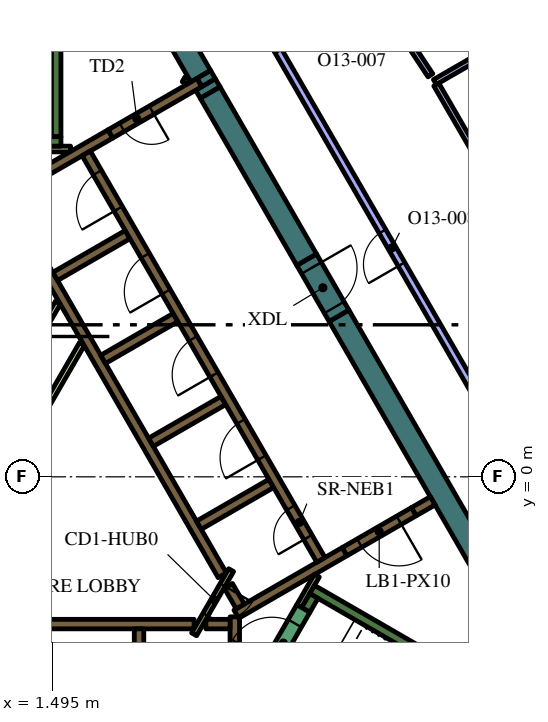
"""IFC4 building model, lengths in metres.
Left out: names, types, materials, properties, quantities, classifications, styles, units other than length and angle.
Written with IfcOpenShell. Run it as: python <this file> out.ifc"""

import sys

from ifc_helpers import new_model, si_unit, direction, frame, frame_2d, origin, place, context, subcontext, project, spatial, polyline, rectangle, outline, extrude, element, fill, save


model = new_model("IFC4")
c1 = context("Model", 3, precision=1e-05, world=origin(), true_north=direction((0.0, 1.0)))
c2 = subcontext(c1, "Body", "Model", "MODEL_VIEW")
j1 = project(units=[si_unit("LENGTHUNIT", "METRE"), si_unit("PLANEANGLEUNIT", "RADIAN")], contexts=[c1])
p1 = place(None, origin())
s1 = spatial("IfcSite", under=j1, at=p1, CompositionType="ELEMENT")
p2 = place(p1, origin())
s2 = spatial("IfcBuilding", under=s1, at=p2, CompositionType="ELEMENT")
p3 = place(p2, frame((0.0, 0.0, 300.6)))
s3 = spatial("IfcBuildingStorey", under=s2, at=p3, CompositionType="ELEMENT", Elevation=300.6)
p4 = place(p3, frame((9.042, 4.239, 0.0), z_axis=(0.0, 0.0, 1.0), x_axis=(0.500005785455, -0.866022063525, 0.0)))
e1 = element("IfcWall", 1, at=p4, inside=s3, PredefinedType="SOLIDWALL", context=c2, shape_type="SweptSolid", body=[
    extrude(rectangle(XDim=12.406, YDim=0.6, at=frame_2d((6.203, 0.0))), origin(), (0.0, 0.0, 1.0), 4.2),
])
p5 = place(p3, frame((5.529, 10.324, 0.0), z_axis=(0.0, 0.0, 1.0), x_axis=(0.499122205112, -0.866531606097, 0.0)))
e2 = element("IfcWall", 2, at=p5, inside=s3, PredefinedType="SOLIDWALL", context=c2, shape_type="SweptSolid", body=[
    extrude(rectangle(XDim=0.247, YDim=0.6, at=frame_2d((0.123, 0.0))), origin(), (0.0, 0.0, 1.0), 4.2),
])
p6 = place(p3, frame((1.989, 16.456, 0.0), z_axis=(0.0, 0.0, 1.0), x_axis=(0.499973159588, -0.866040899549, 0.0)))
e3 = element("IfcWall", 3, at=p6, inside=s3, PredefinedType="SOLIDWALL", context=c2, shape_type="SweptSolid", body=[
    extrude(rectangle(XDim=6.828, YDim=0.6, at=frame_2d((3.414, 0.0))), origin(), (0.0, 0.0, 1.0), 4.2),
])
p7 = place(p3, origin())
e4 = element("IfcWall", 4, at=p7, inside=s3, PredefinedType="SOLIDWALL", context=c2, shape_type="SweptSolid", body=[
    extrude(outline(polyline([(5.664, 10.691), (5.788, 10.476), (5.432, 10.271), (5.308, 10.486), (5.664, 10.691)])), origin(), (0.0, 0.0, 1.0), 4.2),
])
p8 = place(p3, frame((8.192, 5.711, 0.0), z_axis=(0.0, 0.0, 1.0), x_axis=(-0.500006836656, 0.866021456604, 0.0)))
e5 = element("IfcWall", 5, at=p8, inside=s3, PredefinedType="SOLIDWALL", context=c2, shape_type="SweptSolid", body=[
    extrude(rectangle(XDim=5.078, YDim=0.6, at=frame_2d((2.539, 0.0))), origin(), (0.0, 0.0, 1.0), 4.2),
])
p9 = place(p3, frame((8.334, -2.964, 0.0), z_axis=(0.0, 0.0, 1.0), x_axis=(0.866016039709, -0.500016218704, 0.0)))
e6 = element("IfcWall", 6, at=p9, inside=s3, PredefinedType="SOLIDWALL", context=c2, shape_type="SweptSolid", body=[
    extrude(rectangle(XDim=7.05, YDim=0.25, at=frame_2d((3.525, 0.0))), origin(), (0.0, 0.0, 1.0), 4.2),
])
p10 = place(p3, frame((8.168, -3.503, 0.0), z_axis=(0.0, 0.0, 1.0), x_axis=(0.49972245349, 0.866185586049, 0.0)))
e7 = element("IfcWall", 7, at=p10, inside=s3, PredefinedType="SOLIDWALL", context=c2, shape_type="SweptSolid", body=[
    extrude(rectangle(XDim=0.425, YDim=0.25, at=frame_2d((0.212, 0.0))), origin(), (0.0, 0.0, 1.0), 4.2),
])
p11 = place(p3, frame((1.6, 8.95, 0.0), z_axis=(0.0, 0.0, 1.0), x_axis=(0.0, 1.0, 0.0)))
e8 = element("IfcWall", 8, at=p11, inside=s3, PredefinedType="SOLIDWALL", context=c2, shape_type="SweptSolid", body=[
    extrude(rectangle(XDim=6.8, YDim=0.25, at=frame_2d((3.4, 0.0))), origin(), (0.0, 0.0, 1.0), 4.2),
])
p12 = place(p3, frame((1.05, 8.825, 0.0), z_axis=(0.0, 0.0, 1.0), x_axis=(1.0, 0.0, 0.0)))
e9 = element("IfcWall", 9, at=p12, inside=s3, PredefinedType="SOLIDWALL", context=c2, shape_type="SweptSolid", body=[
    extrude(rectangle(XDim=0.675, YDim=0.25, at=frame_2d((0.337, 0.0))), origin(), (0.0, 0.0, 1.0), 4.2),
])
p13 = place(p3, frame((6.3, -7.24, 0.0), z_axis=(0.0, 0.0, 1.0), x_axis=(0.0, 1.0, 0.0)))
e10 = element("IfcWall", 10, at=p13, inside=s3, PredefinedType="SOLIDWALL", context=c2, shape_type="SweptSolid", body=[
    extrude(rectangle(XDim=3.556, YDim=0.25, at=frame_2d((1.778, 0.0))), origin(), (0.0, 0.0, 1.0), 4.2),
])
p14 = place(p3, frame((5.538, -3.875, 0.0), z_axis=(0.0, 0.0, 1.0), x_axis=(1.0, 0.0, 0.0)))
e11 = element("IfcWall", 11, at=p14, inside=s3, PredefinedType="SOLIDWALL", context=c2, shape_type="SweptSolid", body=[
    extrude(rectangle(XDim=0.637, YDim=0.25, at=frame_2d((0.318, 0.0))), origin(), (0.0, 0.0, 1.0), 4.2),
])
p15 = place(p3, frame((-5.259, -3.875, 0.0), z_axis=(0.0, 0.0, 1.0), x_axis=(1.0, 0.0, 0.0)))
e12 = element("IfcWall", 12, at=p15, inside=s3, PredefinedType="SOLIDWALL", context=c2, shape_type="SweptSolid", body=[
    extrude(rectangle(XDim=10.489, YDim=0.25, at=frame_2d((5.244, 0.0))), origin(), (0.0, 0.0, 1.0), 4.2),
])
p16 = place(p3, frame((3.78, -4.0, 0.0), z_axis=(0.0, 0.0, 1.0), x_axis=(0.0, -1.0, 0.0)))
e13 = element("IfcWall", 13, at=p16, inside=s3, PredefinedType="SOLIDWALL", context=c2, shape_type="SweptSolid", body=[
    extrude(rectangle(XDim=2.2, YDim=0.25, at=frame_2d((1.1, 0.0))), origin(), (0.0, 0.0, 1.0), 4.2),
])
p17 = place(p3, frame((9.19, -1.969, 0.0), z_axis=(0.0, 0.0, 1.0), x_axis=(-0.866057109641, -0.499945079824, 0.0)))
e14 = element("IfcWall", 14, at=p17, inside=s3, PredefinedType="SOLIDWALL", context=c2, shape_type="SweptSolid", body=[
    extrude(rectangle(XDim=3.291, YDim=0.25, at=frame_2d((1.646, 0.0))), origin(), (0.0, 0.0, 1.0), 4.2),
])
p18 = place(p3, frame((6.13, -2.867, 0.0), z_axis=(0.0, 0.0, 1.0), x_axis=(0.500160776593, -0.865932559475, 0.0)))
e15 = element("IfcWall", 15, at=p18, inside=s3, PredefinedType="SOLIDWALL", context=c2, shape_type="SweptSolid", body=[
    extrude(rectangle(XDim=0.627, YDim=0.25, at=frame_2d((0.313, 0.0))), origin(), (0.0, 0.0, 1.0), 4.2),
])
p19 = place(p3, frame((11.507, -0.631, 0.0), z_axis=(0.0, 0.0, 1.0), x_axis=(-0.866093731455, -0.499881634324, 0.0)))
e16 = element("IfcWall", 16, at=p19, inside=s3, PredefinedType="SOLIDWALL", context=c2, shape_type="SweptSolid", body=[
    extrude(rectangle(XDim=0.575, YDim=0.25, at=frame_2d((0.288, 0.0))), origin(), (0.0, 0.0, 1.0), 4.2),
])
p20 = place(p3, frame((3.028, 9.023, 0.0), z_axis=(0.0, 0.0, 1.0), x_axis=(-0.866036587186, -0.49998062928, 0.0)))
e17 = element("IfcWall", 17, at=p20, inside=s3, PredefinedType="SOLIDWALL", context=c2, shape_type="SweptSolid", body=[
    extrude(rectangle(XDim=3.384, YDim=0.25, at=frame_2d((1.692, 0.0))), origin(), (0.0, 0.0, 1.0), 4.2),
])
p21 = place(p3, frame((5.97, -2.591, 0.0), z_axis=(0.0, 0.0, 1.0), x_axis=(-0.499994469932, 0.866028596547, 0.0)))
e18 = element("IfcWall", 18, at=p21, inside=s3, PredefinedType="SOLIDWALL", context=c2, shape_type="SweptSolid", body=[
    extrude(rectangle(XDim=10.488, YDim=0.25, at=frame_2d((5.244, 0.0))), origin(), (0.0, 0.0, 1.0), 4.2),
])
p22 = place(p3, frame((1.574, 5.274, 0.0), z_axis=(0.0, 0.0, 1.0), x_axis=(0.866028486751, 0.499994660107, 0.0)))
e19 = element("IfcWall", 19, at=p22, inside=s3, PredefinedType="SOLIDWALL", context=c2, shape_type="SweptSolid", body=[
    extrude(rectangle(XDim=2.2, YDim=0.25, at=frame_2d((1.1, 0.0))), origin(), (0.0, 0.0, 1.0), 4.2),
])
for number, where, z_axis, x_axis in (
    (20, (2.834, 3.091, 0.0), (0.0, 0.0, 1.0), (0.866, 0.5, 0.0)),
    (21, (4.094, 0.909, 0.0), (0.0, 0.0, 1.0), (0.866, 0.5, 0.0)),
    (22, (5.354, -1.274, 0.0), (0.0, 0.0, 1.0), (0.866, 0.5, 0.0)),
):
    element("IfcWall", number, at=place(p3, frame(where, z_axis=z_axis, x_axis=x_axis)), inside=s3, PredefinedType="SOLIDWALL", context=c2, shape_type="SweptSolid", body=[
        extrude(rectangle(XDim=2.2, YDim=0.25, at=frame_2d((1.1, 0.0))), origin(), (0.0, 0.0, 1.0), 4.2),
    ])
p23 = place(p3, frame((1.05, 8.625, 0.0), z_axis=(0.0, 0.0, 1.0), x_axis=(1.0, 0.0, 0.0)))
e23 = element("IfcWall", 23, at=p23, inside=s3, PredefinedType="PARTITIONING", context=c2, shape_type="SweptSolid", body=[
    extrude(rectangle(XDim=0.929, YDim=0.15, at=frame_2d((0.464, 0.0))), origin(), (0.0, 0.0, 1.0), 3.55),
])
p24 = place(p3, frame((4.98, 10.358, 0.0), z_axis=(0.0, 0.0, 1.0), x_axis=(0.500640202437, 0.86565546709, 0.0)))
e24 = element("IfcWall", 24, at=p24, inside=s3, PredefinedType="PARTITIONING", context=c2, shape_type="SweptSolid", body=[
    extrude(rectangle(XDim=0.146, YDim=0.15, at=frame_2d((0.073, 0.0))), origin(), (0.0, 0.0, 1.0), 3.55),
])
p25 = place(p3, frame((8.459, -2.599, 0.0), z_axis=(0.0, 0.0, 1.0), x_axis=(-0.500041054325, -0.866001699761, 0.0)))
e25 = element("IfcWall", 25, at=p25, inside=s3, PredefinedType="PARTITIONING", context=c2, shape_type="SweptSolid", body=[
    extrude(rectangle(XDim=0.929, YDim=0.15, at=frame_2d((0.464, 0.0))), origin(), (0.0, 0.0, 1.0), 4.2),
])
p26 = place(p3, frame((-1.887, -3.718, 0.0), z_axis=(0.0, 0.0, 1.0), x_axis=(0.500005008002, 0.866022512394, 0.0)))
e26 = element("IfcWall", 26, at=p26, inside=s3, PredefinedType="PARTITIONING", context=c2, shape_type="SweptSolid", body=[
    extrude(rectangle(XDim=8.327, YDim=0.15, at=frame_2d((4.164, 0.0))), origin(), (0.0, 0.0, 1.0), 3.55),
])
p27 = place(p3, frame((-0.3, 1.212, 0.0), z_axis=(0.0, 0.0, 1.0), x_axis=(0.499963101113, 0.866046706318, 0.0)))
e27 = element("IfcWall", 27, at=p27, inside=s3, PredefinedType="PARTITIONING", context=c2, shape_type="SweptSolid", body=[
    extrude(rectangle(XDim=3.893, YDim=0.15, at=frame_2d((1.947, 0.0))), origin(), (0.0, 0.0, 1.0), 3.55),
])
p28 = place(p3, frame((8.565, -2.185, 0.0), z_axis=(0.0, 0.0, 1.0), x_axis=(-0.499997954832, 0.866026584559, 0.0)))
e28 = element("IfcWall", 28, at=p28, inside=s3, PredefinedType="SOLIDWALL", context=c2, shape_type="SweptSolid", body=[
    extrude(rectangle(XDim=12.35, YDim=0.25, at=frame_2d((6.175, 0.0))), origin(), (0.0, 0.0, 1.0), 4.2),
])
p29 = place(p28, frame((0.685, 0.0, 0.0)))
e29 = element("IfcOpeningElement", 29, at=p29, cuts=e28, PredefinedType="OPENING", context=c2, shape_type="SweptSolid", body=[
    extrude(rectangle(XDim=0.9, YDim=2.1, at=frame_2d((0.45, 1.05))), frame((0.0, 0.135, 0.0), z_axis=(0.0, -1.0, 0.0), x_axis=(1.0, 0.0, 0.0)), (0.0, 0.0, 1.0), 0.27),
])
p30 = place(p28, frame((3.105, 0.0, 0.0)))
e30 = element("IfcOpeningElement", 30, at=p30, cuts=e28, PredefinedType="OPENING", context=c2, shape_type="SweptSolid", body=[
    extrude(rectangle(XDim=1.1, YDim=2.1, at=frame_2d((0.55, 1.05))), frame((0.0, 0.135, 0.0), z_axis=(0.0, -1.0, 0.0), x_axis=(1.0, 0.0, 0.0)), (0.0, 0.0, 1.0), 0.27),
])
p31 = place(p28, frame((5.625, 0.0, 0.0)))
e31 = element("IfcOpeningElement", 31, at=p31, cuts=e28, PredefinedType="OPENING", context=c2, shape_type="SweptSolid", body=[
    extrude(rectangle(XDim=1.1, YDim=2.1, at=frame_2d((0.55, 1.05))), frame((0.0, 0.135, 0.0), z_axis=(0.0, -1.0, 0.0), x_axis=(1.0, 0.0, 0.0)), (0.0, 0.0, 1.0), 0.27),
])
p32 = place(p28, frame((8.145, 0.0, 0.0)))
e32 = element("IfcOpeningElement", 32, at=p32, cuts=e28, PredefinedType="OPENING", context=c2, shape_type="SweptSolid", body=[
    extrude(rectangle(XDim=1.1, YDim=2.1, at=frame_2d((0.55, 1.05))), frame((0.0, 0.135, 0.0), z_axis=(0.0, -1.0, 0.0), x_axis=(1.0, 0.0, 0.0)), (0.0, 0.0, 1.0), 0.27),
])
p33 = place(p28, frame((10.665, 0.0, 0.0)))
e33 = element("IfcOpeningElement", 33, at=p33, cuts=e28, PredefinedType="OPENING", context=c2, shape_type="SweptSolid", body=[
    extrude(rectangle(XDim=1.1, YDim=2.1, at=frame_2d((0.55, 1.05))), frame((0.0, 0.135, 0.0), z_axis=(0.0, -1.0, 0.0), x_axis=(1.0, 0.0, 0.0)), (0.0, 0.0, 1.0), 0.27),
])
p34 = place(p3, frame((7.053, -5.284, 0.0), z_axis=(0.0, 0.0, 1.0), x_axis=(0.500078061341, 0.865980330357, 0.0)))
e34 = element("IfcWall", 34, at=p34, inside=s3, PredefinedType="SOLIDWALL", context=c2, shape_type="SweptSolid", body=[
    extrude(rectangle(XDim=2.1, YDim=0.4, at=frame_2d((1.05, 0.0))), origin(), (0.0, 0.0, 1.0), 4.2),
])
p35 = place(p34, frame((0.45, 0.0, 0.0)))
e35 = element("IfcOpeningElement", 35, at=p35, cuts=e34, PredefinedType="OPENING", context=c2, shape_type="SweptSolid", body=[
    extrude(rectangle(XDim=1.2, YDim=2.1, at=frame_2d((0.6, 1.05))), frame((0.0, 0.21, 0.0), z_axis=(0.0, -1.0, 0.0), x_axis=(1.0, 0.0, 0.0)), (0.0, 0.0, 1.0), 0.42),
])
p36 = place(p3, frame((5.366, 10.373, 0.0), z_axis=(0.0, 0.0, 1.0), x_axis=(-0.866019956843, -0.50000943426, 0.0)))
e36 = element("IfcWall", 36, at=p36, inside=s3, PredefinedType="SOLIDWALL", context=c2, shape_type="SweptSolid", body=[
    extrude(rectangle(XDim=2.7, YDim=0.25, at=frame_2d((1.35, 0.0))), origin(), (0.0, 0.0, 1.0), 4.2),
])
p37 = place(p36, frame((1.45, 0.0, 0.0)))
e37 = element("IfcOpeningElement", 37, at=p37, cuts=e36, PredefinedType="OPENING", context=c2, shape_type="SweptSolid", body=[
    extrude(rectangle(XDim=0.9, YDim=2.1, at=frame_2d((0.45, 1.05))), frame((0.0, 0.135, 0.0), z_axis=(0.0, -1.0, 0.0), x_axis=(1.0, 0.0, 0.0)), (0.0, 0.0, 1.0), 0.27),
])
p38 = place(p3, frame((6.203, -2.456, 0.0), z_axis=(0.0, 0.0, 1.0), x_axis=(-0.500043961785, -0.866000020948, 0.0)))
e38 = element("IfcWall", 38, at=p38, inside=s3, PredefinedType="PARTITIONING", context=c2, shape_type="SweptSolid", body=[
    extrude(rectangle(XDim=1.95, YDim=0.15, at=frame_2d((0.975, 0.0))), origin(), (0.0, 0.0, 1.0), 4.2),
])
p39 = place(p38, frame((0.45, 0.0, 0.0)))
e39 = element("IfcOpeningElement", 39, at=p39, cuts=e38, PredefinedType="OPENING", context=c2, shape_type="SweptSolid", body=[
    extrude(rectangle(XDim=0.9, YDim=2.1, at=frame_2d((0.45, 1.05))), frame((0.0, 0.085, 0.0), z_axis=(0.0, -1.0, 0.0), x_axis=(1.0, 0.0, 0.0)), (0.0, 0.0, 1.0), 0.17),
])
p40 = place(p3, frame((11.009, -0.919, 0.0), z_axis=(0.0, 0.0, 1.0), x_axis=(-0.866059744384, -0.49994051562, 0.0)))
e40 = element("IfcWall", 40, at=p40, inside=s3, PredefinedType="SOLIDWALL", context=c2, shape_type="SweptSolid", body=[
    extrude(rectangle(XDim=2.1, YDim=0.25, at=frame_2d((1.05, 0.0))), origin(), (0.0, 0.0, 1.0), 4.2),
])
p41 = place(p40, frame((0.45, 0.0, 0.0)))
e41 = element("IfcOpeningElement", 41, at=p41, cuts=e40, PredefinedType="OPENING", context=c2, shape_type="SweptSolid", body=[
    extrude(rectangle(XDim=1.2, YDim=2.1, at=frame_2d((0.6, 1.05))), frame((0.0, 0.135, 0.0), z_axis=(0.0, -1.0, 0.0), x_axis=(1.0, 0.0, 0.0)), (0.0, 0.0, 1.0), 0.27),
])
p42 = place(p3, frame((8.192, 5.711, 0.0), z_axis=(0.0, 0.0, 1.0), x_axis=(0.500062241894, -0.865989465428, 0.0)))
e42 = element("IfcWall", 42, at=p42, inside=s3, PredefinedType="SOLIDWALL", context=c2, shape_type="SweptSolid", body=[
    extrude(rectangle(XDim=1.7, YDim=0.6, at=frame_2d((0.85, 0.0))), origin(), (0.0, 0.0, 1.0), 4.2),
])
p43 = place(p42, frame((0.25, 0.0, 0.0)))
e43 = element("IfcOpeningElement", 43, at=p43, cuts=e42, PredefinedType="OPENING", context=c2, shape_type="SweptSolid", body=[
    extrude(rectangle(XDim=1.2, YDim=2.1, at=frame_2d((0.6, 1.05))), frame((0.0, 0.31, 0.0), z_axis=(0.0, -1.0, 0.0), x_axis=(1.0, 0.0, 0.0)), (0.0, 0.0, 1.0), 0.62),
])
p44 = place(p3, frame((11.564, 10.387, 0.0), z_axis=(0.0, 0.0, 1.0), x_axis=(0.86604641216, 0.499963610661, 0.0)))
e44 = element("IfcWall", 44, at=p44, inside=s3, PredefinedType="PARTITIONING", context=c2, shape_type="SweptSolid", body=[
    extrude(rectangle(XDim=3.096, YDim=0.15, at=frame_2d((1.548, 0.0))), origin(), (0.0, 0.0, 1.0), 3.55),
])
p45 = place(p3, frame((11.602, 10.322, 0.0), z_axis=(0.0, 0.0, 1.0), x_axis=(0.500961140821, -0.865469777281, 0.0)))
e45 = element("IfcWall", 45, at=p45, inside=s3, PredefinedType="PARTITIONING", context=c2, shape_type="SweptSolid", body=[
    extrude(rectangle(XDim=6.021, YDim=0.15, at=frame_2d((3.01, 0.0))), origin(), (0.0, 0.0, 1.0), 3.55),
])
p46 = place(p45, frame((2.521, 0.0, 0.0)))
e46 = element("IfcOpeningElement", 46, at=p46, cuts=e45, PredefinedType="OPENING", context=c2, shape_type="SweptSolid", body=[
    extrude(rectangle(XDim=0.9, YDim=2.1, at=frame_2d((0.45, 1.05))), frame((0.0, 0.085, 0.0), z_axis=(0.0, -1.0, 0.0), x_axis=(1.0, 0.0, 0.0)), (0.0, 0.0, 1.0), 0.17),
])
p47 = place(p3, frame((9.795, 13.068, 0.0), z_axis=(0.0, 0.0, 1.0), x_axis=(0.550767347659, -0.834658809786, 0.0)))
e47 = element("IfcWall", 47, at=p47, inside=s3, PredefinedType="PARTITIONING", context=c2, shape_type="SweptSolid", body=[
    extrude(rectangle(XDim=2.999, YDim=0.15, at=frame_2d((1.5, 0.0))), origin(), (0.0, 0.0, 1.0), 3.55),
])
p48 = place(p47, frame((1.099, 0.0, 0.0)))
e48 = element("IfcOpeningElement", 48, at=p48, cuts=e47, PredefinedType="OPENING", context=c2, shape_type="SweptSolid", body=[
    extrude(rectangle(XDim=0.9, YDim=2.1, at=frame_2d((0.45, 1.05))), frame((0.0, 0.085, 0.0), z_axis=(0.0, -1.0, 0.0), x_axis=(1.0, 0.0, 0.0)), (0.0, 0.0, 1.0), 0.17),
])
p49 = place(p3, frame((13.436, 0.829, 0.0), z_axis=(0.0, 0.0, 1.0), x_axis=(-0.49999894854, 0.866026010844, 0.0)))
e49 = element("IfcWall", 49, at=p49, inside=s3, PredefinedType="PARTITIONING", context=c2, shape_type="SweptSolid", body=[
    extrude(rectangle(XDim=12.0, YDim=0.2, at=frame_2d((6.0, 0.0))), origin(), (0.0, 0.0, 1.0), 3.55),
])
p50 = place(p49, frame((5.5, 0.0, 0.0)))
e50 = element("IfcOpeningElement", 50, at=p50, cuts=e49, PredefinedType="OPENING", context=c2, shape_type="SweptSolid", body=[
    extrude(rectangle(XDim=1.0, YDim=2.1, at=frame_2d((0.5, 1.05))), frame((0.0, 0.11, 0.0), z_axis=(0.0, -1.0, 0.0), x_axis=(1.0, 0.0, 0.0)), (0.0, 0.0, 1.0), 0.22),
])
p51 = place(p29, origin())
e51 = element("IfcDoor", 51, at=p51, inside=s3, OperationType="SINGLE_SWING_LEFT", PredefinedType="DOOR", context=c2, shape_type="SweptSolid", body=[
    extrude(rectangle(XDim=0.9, YDim=2.1, at=frame_2d((0.45, 1.05))), frame((0.0, 0.025, 0.0), z_axis=(0.0, -1.0, 0.0), x_axis=(1.0, 0.0, 0.0)), (0.0, 0.0, 1.0), 0.05),
])
fill(e29, e51)
p52 = place(p30, origin())
e52 = element("IfcDoor", 52, at=p52, inside=s3, OperationType="DOUBLE_DOOR_SLIDING", PredefinedType="DOOR", context=c2, shape_type="SweptSolid", body=[
    extrude(rectangle(XDim=1.1, YDim=2.1, at=frame_2d((0.55, 1.05))), frame((0.0, 0.025, 0.0), z_axis=(0.0, -1.0, 0.0), x_axis=(1.0, 0.0, 0.0)), (0.0, 0.0, 1.0), 0.05),
])
fill(e30, e52)
p53 = place(p31, origin())
e53 = element("IfcDoor", 53, at=p53, inside=s3, OperationType="DOUBLE_DOOR_SLIDING", PredefinedType="DOOR", context=c2, shape_type="SweptSolid", body=[
    extrude(rectangle(XDim=1.1, YDim=2.1, at=frame_2d((0.55, 1.05))), frame((0.0, 0.025, 0.0), z_axis=(0.0, -1.0, 0.0), x_axis=(1.0, 0.0, 0.0)), (0.0, 0.0, 1.0), 0.05),
])
fill(e31, e53)
p54 = place(p32, origin())
e54 = element("IfcDoor", 54, at=p54, inside=s3, OperationType="DOUBLE_DOOR_SLIDING", PredefinedType="DOOR", context=c2, shape_type="SweptSolid", body=[
    extrude(rectangle(XDim=1.1, YDim=2.1, at=frame_2d((0.55, 1.05))), frame((0.0, 0.025, 0.0), z_axis=(0.0, -1.0, 0.0), x_axis=(1.0, 0.0, 0.0)), (0.0, 0.0, 1.0), 0.05),
])
fill(e32, e54)
p55 = place(p33, origin())
e55 = element("IfcDoor", 55, at=p55, inside=s3, OperationType="DOUBLE_DOOR_SLIDING", PredefinedType="DOOR", context=c2, shape_type="SweptSolid", body=[
    extrude(rectangle(XDim=1.1, YDim=2.1, at=frame_2d((0.55, 1.05))), frame((0.0, 0.025, 0.0), z_axis=(0.0, -1.0, 0.0), x_axis=(1.0, 0.0, 0.0)), (0.0, 0.0, 1.0), 0.05),
])
fill(e33, e55)
p56 = place(p35, origin())
e56 = element("IfcDoor", 56, at=p56, inside=s3, OperationType="SINGLE_SWING_LEFT", PredefinedType="DOOR", context=c2, shape_type="SweptSolid", body=[
    extrude(rectangle(XDim=1.2, YDim=2.1, at=frame_2d((0.6, 1.05))), frame((0.0, 0.025, 0.0), z_axis=(0.0, -1.0, 0.0), x_axis=(1.0, 0.0, 0.0)), (0.0, 0.0, 1.0), 0.05),
])
fill(e35, e56)
p57 = place(p37, origin())
e57 = element("IfcDoor", 57, at=p57, inside=s3, OperationType="SINGLE_SWING_LEFT", PredefinedType="DOOR", context=c2, shape_type="SweptSolid", body=[
    extrude(rectangle(XDim=0.9, YDim=2.1, at=frame_2d((0.45, 1.05))), frame((0.0, 0.025, 0.0), z_axis=(0.0, -1.0, 0.0), x_axis=(1.0, 0.0, 0.0)), (0.0, 0.0, 1.0), 0.05),
])
fill(e37, e57)
p58 = place(p39, origin())
e58 = element("IfcDoor", 58, at=p58, inside=s3, OperationType="SINGLE_SWING_LEFT", PredefinedType="DOOR", context=c2, shape_type="SweptSolid", body=[
    extrude(rectangle(XDim=0.9, YDim=2.1, at=frame_2d((0.45, 1.05))), frame((0.0, 0.025, 0.0), z_axis=(0.0, -1.0, 0.0), x_axis=(1.0, 0.0, 0.0)), (0.0, 0.0, 1.0), 0.05),
])
fill(e39, e58)
p59 = place(p41, origin())
e59 = element("IfcDoor", 59, at=p59, inside=s3, OperationType="SINGLE_SWING_LEFT", PredefinedType="DOOR", context=c2, shape_type="SweptSolid", body=[
    extrude(rectangle(XDim=1.2, YDim=2.1, at=frame_2d((0.6, 1.05))), frame((0.0, 0.025, 0.0), z_axis=(0.0, -1.0, 0.0), x_axis=(1.0, 0.0, 0.0)), (0.0, 0.0, 1.0), 0.05),
])
fill(e41, e59)
p60 = place(p43, origin())
e60 = element("IfcDoor", 60, at=p60, inside=s3, OperationType="SINGLE_SWING_LEFT", PredefinedType="DOOR", context=c2, shape_type="SweptSolid", body=[
    extrude(rectangle(XDim=1.2, YDim=2.1, at=frame_2d((0.6, 1.05))), frame((0.0, 0.025, 0.0), z_axis=(0.0, -1.0, 0.0), x_axis=(1.0, 0.0, 0.0)), (0.0, 0.0, 1.0), 0.05),
])
fill(e43, e60)
p61 = place(p50, origin())
e61 = element("IfcDoor", 61, at=p61, inside=s3, OperationType="SINGLE_SWING_RIGHT", PredefinedType="DOOR", context=c2, shape_type="SweptSolid", body=[
    extrude(rectangle(XDim=1.0, YDim=2.1, at=frame_2d((0.5, 1.05))), frame((0.0, 0.025, 0.0), z_axis=(0.0, -1.0, 0.0), x_axis=(1.0, 0.0, 0.0)), (0.0, 0.0, 1.0), 0.05),
])
fill(e50, e61)
save(model, sys.argv[1])
